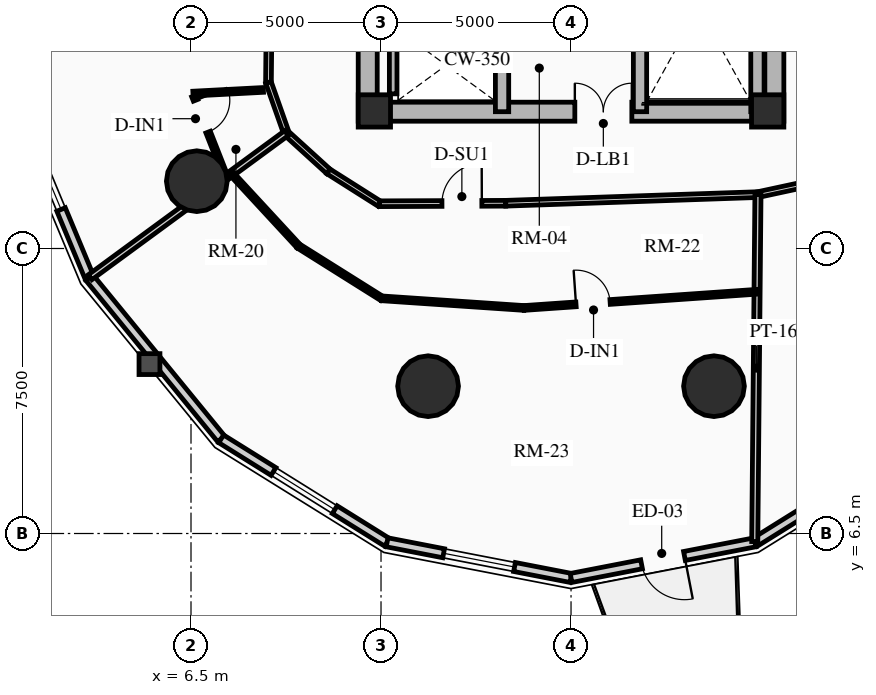
"""IFC4 building model, lengths in metres.
Left out: names, types, materials, properties, quantities, classifications, styles, units other than length and angle.
Written with IfcOpenShell. Run it as: python <this file> out.ifc"""

import sys

from ifc_helpers import new_model, si_unit, direction, frame, frame_2d, origin, origin_2d, place, context, subcontext, project, spatial, rectangle, circle, extrude, source, transform, mapped, element, fill, save


model = new_model("IFC4")
c1 = context("Model", 3, precision=1e-05, world=origin(), true_north=direction((0.0, 1.0)))
c2 = subcontext(c1, "Body", "Model", "MODEL_VIEW")
j1 = project(units=[si_unit("LENGTHUNIT", "METRE"), si_unit("PLANEANGLEUNIT", "RADIAN")], contexts=[c1])
p1 = place(None, origin())
s1 = spatial("IfcSite", under=j1, at=p1, CompositionType="ELEMENT")
p2 = place(p1, origin())
s2 = spatial("IfcBuilding", under=s1, at=p2, CompositionType="ELEMENT")
p3 = place(p2, frame((0.0, 0.0, 51.1)))
s3 = spatial("IfcBuildingStorey", under=s2, at=p3, CompositionType="ELEMENT", Elevation=51.1)
for number, where, z_axis, x_axis in (
    (1, (11.15, 17.35, 0.0), (0.0, 0.0, 1.0), (0.0, 1.0, 0.0)),
    (2, (21.85, 17.35, 0.0), (0.0, 0.0, 1.0), (0.0, 1.0, 0.0)),
):
    element("IfcWall", number, at=place(p3, frame(where, z_axis=z_axis, x_axis=x_axis)), inside=s3, PredefinedType="SHEAR", context=c2, shape_type="SweptSolid", body=[
        extrude(rectangle(XDim=14.3, YDim=0.5, at=frame_2d((7.15, 0.0))), origin(), (0.0, 0.0, 1.0), 2.91),
    ])
p4 = place(p3, frame((11.15, 17.6, 0.0), z_axis=(0.0, 0.0, 1.0), x_axis=(1.0, 0.0, 0.0)))
e3 = element("IfcWall", 3, at=p4, inside=s3, PredefinedType="SHEAR", context=c2, shape_type="SweptSolid", body=[
    extrude(rectangle(XDim=10.7, YDim=0.5, at=frame_2d((5.35, 0.0))), origin(), (0.0, 0.0, 1.0), 2.91),
])
m1 = source(origin(), c2, "Body", "SweptSolid", [
    extrude(rectangle(XDim=1.5, YDim=2.02, at=frame_2d((0.75, 1.01))), frame((0.0, 0.26, 0.0), z_axis=(0.0, -1.0, 0.0), x_axis=(1.0, 0.0, 0.0)), (0.0, 0.0, 1.0), 0.52),
])
p5 = place(p4, frame((5.45, 0.0, 0.0)))
e4 = element("IfcOpeningElement", 4, at=p5, cuts=e3, PredefinedType="OPENING", context=c2, shape_type="MappedRepresentation", body=[
    mapped(m1, transform((0.0, 0.0, 0.0), x_axis=(1.0, 0.0, 0.0), y_axis=(0.0, 1.0, 0.0), z_axis=(0.0, 0.0, 1.0), scale=1.0)),
])
p6 = place(p3, frame((14.685, 17.6, 0.0), z_axis=(0.0, 0.0, 1.0), x_axis=(0.0, 1.0, 0.0)))
e5 = element("IfcWall", 5, at=p6, inside=s3, PredefinedType="SHEAR", context=c2, shape_type="SweptSolid", body=[
    extrude(rectangle(XDim=13.8, YDim=0.35, at=frame_2d((6.9, 0.0))), origin(), (0.0, 0.0, 1.0), 2.91),
])
m2 = source(origin(), c2, "Body", "SweptSolid", [
    extrude(rectangle(XDim=1.1, YDim=2.015, at=frame_2d((0.55, 1.007))), frame((0.0, 0.185, 0.0), z_axis=(0.0, -1.0, 0.0), x_axis=(1.0, 0.0, 0.0)), (0.0, 0.0, 1.0), 0.37),
])
p7 = place(p6, frame((4.9, 0.0, 0.0)))
e6 = element("IfcOpeningElement", 6, at=p7, cuts=e5, PredefinedType="OPENING", context=c2, shape_type="MappedRepresentation", body=[
    mapped(m2, transform((0.0, 0.0, 0.0), x_axis=(1.0, 0.0, 0.0), y_axis=(0.0, 1.0, 0.0), z_axis=(0.0, 0.0, 1.0), scale=1.0)),
])
m3 = source(origin(), c2, "Body", "SweptSolid", [
    extrude(rectangle(XDim=1.15, YDim=2.02, at=frame_2d((0.575, 1.01))), frame((0.0, 0.185, 0.0), z_axis=(0.0, -1.0, 0.0), x_axis=(1.0, 0.0, 0.0)), (0.0, 0.0, 1.0), 0.37),
])
p8 = place(p6, frame((7.32, 0.0, 0.0)))
e7 = element("IfcOpeningElement", 7, at=p8, cuts=e5, PredefinedType="OPENING", context=c2, shape_type="MappedRepresentation", body=[
    mapped(m3, transform((0.0, 0.0, 0.0), x_axis=(1.0, 0.0, 0.0), y_axis=(0.0, 1.0, 0.0), z_axis=(0.0, 0.0, 1.0), scale=1.0)),
])
p9 = place(p3, frame((18.315, 17.6, 0.0), z_axis=(0.0, 0.0, 1.0), x_axis=(0.0, 1.0, 0.0)))
e8 = element("IfcWall", 8, at=p9, inside=s3, PredefinedType="SHEAR", context=c2, shape_type="SweptSolid", body=[
    extrude(rectangle(XDim=13.8, YDim=0.35, at=frame_2d((6.9, 0.0))), origin(), (0.0, 0.0, 1.0), 2.91),
])
p10 = place(p9, frame((10.025, 0.0, 0.0)))
e9 = element("IfcOpeningElement", 9, at=p10, cuts=e8, PredefinedType="OPENING", context=c2, shape_type="MappedRepresentation", body=[
    mapped(m2, transform((0.0, 0.0, 0.0), x_axis=(1.0, 0.0, 0.0), y_axis=(0.0, 1.0, 0.0), z_axis=(0.0, 0.0, 1.0), scale=1.0)),
])
p11 = place(p9, frame((12.025, 0.0, 0.0)))
e10 = element("IfcOpeningElement", 10, at=p11, cuts=e8, PredefinedType="OPENING", context=c2, shape_type="MappedRepresentation", body=[
    mapped(m2, transform((0.0, 0.0, 0.0), x_axis=(1.0, 0.0, 0.0), y_axis=(0.0, 1.0, 0.0), z_axis=(0.0, 0.0, 1.0), scale=1.0)),
])
p12 = place(p9, frame((5.33, 0.0, 0.0)))
e11 = element("IfcOpeningElement", 11, at=p12, cuts=e8, PredefinedType="OPENING", context=c2, shape_type="MappedRepresentation", body=[
    mapped(m3, transform((0.0, 0.0, 0.0), x_axis=(1.0, 0.0, 0.0), y_axis=(0.0, 1.0, 0.0), z_axis=(0.0, 0.0, 1.0), scale=1.0)),
])
p13 = place(p3, frame((21.405, 17.6, 0.0), z_axis=(0.0, 0.0, 1.0), x_axis=(0.0, 1.0, 0.0)))
e12 = element("IfcWall", 12, at=p13, inside=s3, PredefinedType="SHEAR", context=c2, shape_type="SweptSolid", body=[
    extrude(rectangle(XDim=6.745, YDim=0.35, at=frame_2d((3.373, 0.0))), origin(), (0.0, 0.0, 1.0), 2.91),
])
for number, where, z_axis, x_axis in (
    (13, (11.325, 17.62, 0.0), (0.0, 0.0, 1.0), (1.0, 0.0, 0.0)),
    (14, (21.675, 17.62, 0.0), (0.0, 0.0, 1.0), (1.0, 0.0, 0.0)),
):
    element("IfcColumn", number, at=place(p3, frame(where, z_axis=z_axis, x_axis=x_axis)), inside=s3, PredefinedType="COLUMN", context=c2, shape_type="SweptSolid", body=[
        extrude(rectangle(XDim=0.85, YDim=0.85, at=origin_2d()), origin(), (0.0, 0.0, 1.0), 2.91),
    ])
for number, where, z_axis, x_axis in (
    (15, (6.653, 15.771, 0.0), (0.0, 0.0, 1.0), (1.0, 0.0, 0.0)),
    (16, (12.739, 10.377, 0.0), (0.0, 0.0, 1.0), (1.0, 0.0, 0.0)),
    (17, (20.261, 10.377, 0.0), (0.0, 0.0, 1.0), (1.0, 0.0, 0.0)),
):
    element("IfcColumn", number, at=place(p3, frame(where, z_axis=z_axis, x_axis=x_axis)), inside=s3, PredefinedType="USERDEFINED", context=c2, shape_type="SweptSolid", body=[
        extrude(circle(Radius=0.8, at=origin_2d()), origin(), (0.0, 0.0, 1.0), 2.91),
    ])
p14 = place(p3, frame((3.828, 13.232, 0.0), z_axis=(0.0, 0.0, 1.0), x_axis=(-0.384348836956, 0.923187939442, 0.0)))
e18 = element("IfcWall", 18, at=p14, inside=s3, PredefinedType="SOLIDWALL", context=c2, shape_type="SweptSolid", body=[
    extrude(rectangle(XDim=5.789, YDim=0.24, at=frame_2d((2.894, 0.0))), origin(), (0.0, 0.0, 1.0), 2.073),
])
m4 = source(origin(), c2, "Body", "SweptSolid", [
    extrude(rectangle(XDim=1.9, YDim=1.35, at=frame_2d((0.95, 0.675))), frame((0.0, 0.13, 0.0), z_axis=(0.0, -1.0, 0.0), x_axis=(1.0, 0.0, 0.0)), (0.0, 0.0, 1.0), 0.26),
])
p15 = place(p14, frame((1.944, 0.0, 0.65)))
e19 = element("IfcOpeningElement", 19, at=p15, cuts=e18, PredefinedType="OPENING", context=c2, shape_type="MappedRepresentation", body=[
    mapped(m4, transform((0.0, 0.0, 0.0), x_axis=(1.0, 0.0, 0.0), y_axis=(0.0, 1.0, 0.0), z_axis=(0.0, 0.0, 1.0), scale=1.0)),
])
p16 = place(p3, frame((7.293, 8.991, 0.0), z_axis=(0.0, 0.0, 1.0), x_axis=(-0.632713287022, 0.77438614168, 0.0)))
e20 = element("IfcWall", 20, at=p16, inside=s3, PredefinedType="SOLIDWALL", context=c2, shape_type="SweptSolid", body=[
    extrude(rectangle(XDim=5.477, YDim=0.24, at=frame_2d((2.738, 0.0))), origin(), (0.0, 0.0, 1.0), 2.073),
])
p17 = place(p3, frame((11.66, 6.268, 0.0), z_axis=(0.0, 0.0, 1.0), x_axis=(-0.848533613342, 0.529141481107, 0.0)))
e21 = element("IfcWall", 21, at=p17, inside=s3, PredefinedType="SOLIDWALL", context=c2, shape_type="SweptSolid", body=[
    extrude(rectangle(XDim=5.146, YDim=0.24, at=frame_2d((2.573, 0.0))), origin(), (0.0, 0.0, 1.0), 2.073),
])
p18 = place(p17, frame((1.623, 0.0, 0.65)))
e22 = element("IfcOpeningElement", 22, at=p18, cuts=e21, PredefinedType="OPENING", context=c2, shape_type="MappedRepresentation", body=[
    mapped(m4, transform((0.0, 0.0, 0.0), x_axis=(1.0, 0.0, 0.0), y_axis=(0.0, 1.0, 0.0), z_axis=(0.0, 0.0, 1.0), scale=1.0)),
])
p19 = place(p3, frame((16.5, 5.33, 0.0), z_axis=(0.0, 0.0, 1.0), x_axis=(-0.981725274071, 0.190303668512, 0.0)))
e23 = element("IfcWall", 23, at=p19, inside=s3, PredefinedType="SOLIDWALL", context=c2, shape_type="SweptSolid", body=[
    extrude(rectangle(XDim=4.93, YDim=0.24, at=frame_2d((2.465, 0.0))), origin(), (0.0, 0.0, 1.0), 2.073),
])
p20 = place(p19, frame((1.515, 0.0, 0.65)))
e24 = element("IfcOpeningElement", 24, at=p20, cuts=e23, PredefinedType="OPENING", context=c2, shape_type="MappedRepresentation", body=[
    mapped(m4, transform((0.0, 0.0, 0.0), x_axis=(1.0, 0.0, 0.0), y_axis=(0.0, 1.0, 0.0), z_axis=(0.0, 0.0, 1.0), scale=1.0)),
])
p21 = place(p3, frame((21.34, 6.268, 0.0), z_axis=(0.0, 0.0, 1.0), x_axis=(-0.981725274071, -0.190303668512, 0.0)))
e25 = element("IfcWall", 25, at=p21, inside=s3, PredefinedType="SOLIDWALL", context=c2, shape_type="SweptSolid", body=[
    extrude(rectangle(XDim=4.93, YDim=0.24, at=frame_2d((2.465, 0.0))), origin(), (0.0, 0.0, 1.0), 2.073),
])
m5 = source(origin(), c2, "Body", "SweptSolid", [
    extrude(rectangle(XDim=1.15, YDim=2.005, at=frame_2d((0.575, 1.002))), frame((0.0, 0.13, 0.0), z_axis=(0.0, -1.0, 0.0), x_axis=(1.0, 0.0, 0.0)), (0.0, 0.0, 1.0), 0.26),
])
p22 = place(p21, frame((1.89, 0.0, 0.0)))
e26 = element("IfcOpeningElement", 26, at=p22, cuts=e25, PredefinedType="OPENING", context=c2, shape_type="MappedRepresentation", body=[
    mapped(m5, transform((0.0, 0.0, 0.0), x_axis=(1.0, 0.0, 0.0), y_axis=(0.0, 1.0, 0.0), z_axis=(0.0, 0.0, 1.0), scale=1.0)),
])
p23 = place(p3, frame((25.707, 8.991, 0.0), z_axis=(0.0, 0.0, 1.0), x_axis=(-0.848533613342, -0.529141481107, 0.0)))
e27 = element("IfcWall", 27, at=p23, inside=s3, PredefinedType="SOLIDWALL", context=c2, shape_type="SweptSolid", body=[
    extrude(rectangle(XDim=5.146, YDim=0.24, at=frame_2d((2.573, 0.0))), origin(), (0.0, 0.0, 1.0), 2.073),
])
p24 = place(p3, frame((11.82, 18.07, 0.0), z_axis=(0.0, 0.0, 1.0), x_axis=(0.0, 1.0, 0.0)))
e28 = element("IfcWall", 28, at=p24, inside=s3, PredefinedType="SHEAR", context=c2, shape_type="SweptSolid", body=[
    extrude(rectangle(XDim=1.635, YDim=0.2, at=frame_2d((0.817, 0.0))), origin(), (0.0, 0.0, 1.0), 2.91),
])
p25 = place(p3, frame((8.6, 24.5, 0.0), z_axis=(0.0, 0.0, 1.0), x_axis=(-0.010076760723, -0.999949228158, 0.0)))
e29 = element("IfcWall", 29, at=p25, inside=s3, PredefinedType="PARTITIONING", context=c2, shape_type="SweptSolid", body=[
    extrude(rectangle(XDim=6.13, YDim=0.15, at=frame_2d((3.065, 0.0))), origin(), (0.0, 0.0, 1.0), 2.159),
])
m6 = source(origin(), c2, "Body", "SweptSolid", [
    extrude(rectangle(XDim=1.05, YDim=2.015, at=frame_2d((0.525, 1.007))), frame((0.0, 0.085, 0.0), z_axis=(0.0, -1.0, 0.0), x_axis=(1.0, 0.0, 0.0)), (0.0, 0.0, 1.0), 0.17),
])
p26 = place(p25, frame((2.54, 0.0, 0.0)))
e30 = element("IfcOpeningElement", 30, at=p26, cuts=e29, PredefinedType="OPENING", context=c2, shape_type="MappedRepresentation", body=[
    mapped(m6, transform((0.0, 0.0, 0.0), x_axis=(1.0, 0.0, 0.0), y_axis=(0.0, 1.0, 0.0), z_axis=(0.0, 0.0, 1.0), scale=1.0)),
])
p27 = place(p3, frame((8.538, 18.371, 0.0), z_axis=(0.0, 0.0, 1.0), x_axis=(0.3330273821, -0.942917155837, 0.0)))
e31 = element("IfcWall", 31, at=p27, inside=s3, PredefinedType="PARTITIONING", context=c2, shape_type="SweptSolid", body=[
    extrude(rectangle(XDim=1.417, YDim=0.15, at=frame_2d((0.708, 0.0))), origin(), (0.0, 0.0, 1.0), 2.205),
])
p28 = place(p3, frame((9.01, 17.034, 0.0), z_axis=(0.0, 0.0, 1.0), x_axis=(0.739733009791, -0.672900493554, 0.0)))
e32 = element("IfcWall", 32, at=p28, inside=s3, PredefinedType="PARTITIONING", context=c2, shape_type="SweptSolid", body=[
    extrude(rectangle(XDim=1.494, YDim=0.15, at=frame_2d((0.747, 0.0))), origin(), (0.0, 0.0, 1.0), 2.159),
])
p29 = place(p3, frame((10.115, 16.029, 0.0), z_axis=(0.0, 0.0, 1.0), x_axis=(0.844897677802, -0.534927952201, 0.0)))
e33 = element("IfcWall", 33, at=p29, inside=s3, PredefinedType="PARTITIONING", context=c2, shape_type="SweptSolid", body=[
    extrude(rectangle(XDim=1.591, YDim=0.15, at=frame_2d((0.795, 0.0))), origin(), (0.0, 0.0, 1.0), 2.205),
])
p30 = place(p3, frame((11.46, 15.178, 0.0), z_axis=(0.0, 0.0, 1.0), x_axis=(0.999992694689, 0.003822377251, 0.0)))
e34 = element("IfcWall", 34, at=p30, inside=s3, PredefinedType="PARTITIONING", context=c2, shape_type="SweptSolid", body=[
    extrude(rectangle(XDim=3.321, YDim=0.15, at=frame_2d((1.661, 0.0))), origin(), (0.0, 0.0, 1.0), 2.159),
])
p31 = place(p30, frame((1.643, 0.0, 0.0)))
e35 = element("IfcOpeningElement", 35, at=p31, cuts=e34, PredefinedType="OPENING", context=c2, shape_type="MappedRepresentation", body=[
    mapped(m6, transform((0.0, 0.0, 0.0), x_axis=(1.0, 0.0, 0.0), y_axis=(0.0, 1.0, 0.0), z_axis=(0.0, 0.0, 1.0), scale=1.0)),
])
p32 = place(p3, frame((14.781, 15.191, 0.0), z_axis=(0.0, 0.0, 1.0), x_axis=(0.999412963972, 0.034259705842, 0.0)))
e36 = element("IfcWall", 36, at=p32, inside=s3, PredefinedType="PARTITIONING", context=c2, shape_type="SweptSolid", body=[
    extrude(rectangle(XDim=6.642, YDim=0.15, at=frame_2d((3.321, 0.0))), origin(), (0.0, 0.0, 1.0), 2.159),
])
p33 = place(p3, frame((21.419, 15.418, 0.0), z_axis=(0.0, 0.0, 1.0), x_axis=(0.977540384091, 0.210748184977, 0.0)))
e37 = element("IfcWall", 37, at=p33, inside=s3, PredefinedType="PARTITIONING", context=c2, shape_type="SweptSolid", body=[
    extrude(rectangle(XDim=1.887, YDim=0.15, at=frame_2d((0.944, 0.0))), origin(), (0.0, 0.0, 1.0), 2.205),
])
p34 = place(p3, frame((9.01, 17.034, 0.0), z_axis=(0.0, 0.0, 1.0), x_axis=(-0.806234156757, -0.591596555499, 0.0)))
e38 = element("IfcWall", 38, at=p34, inside=s3, PredefinedType="PARTITIONING", context=c2, shape_type="SweptSolid", body=[
    extrude(rectangle(XDim=6.407, YDim=0.16, at=frame_2d((3.204, 0.0))), origin(), (0.0, 0.0, 1.0), 2.073),
])
p35 = place(p3, frame((21.419, 15.418, 0.0), z_axis=(0.0, 0.0, 1.0), x_axis=(-0.009277675551, -0.999956961442, 0.0)))
e39 = element("IfcWall", 39, at=p35, inside=s3, PredefinedType="PARTITIONING", context=c2, shape_type="SweptSolid", body=[
    extrude(rectangle(XDim=9.131, YDim=0.16, at=frame_2d((4.566, 0.0))), origin(), (0.0, 0.0, 1.0), 2.073),
])
p36 = place(p3, frame((8.404, 18.173, 0.0), z_axis=(0.0, 0.0, 1.0), x_axis=(-0.998640999178, -0.052116741655, 0.0)))
e40 = element("IfcWall", 40, at=p36, inside=s3, PredefinedType="PARTITIONING", context=c2, shape_type="SweptSolid", body=[
    extrude(rectangle(XDim=1.855, YDim=0.125, at=frame_2d((0.927, 0.0))), origin(), (0.0, 0.0, 1.0), 2.205),
])
p37 = place(p3, frame((6.577, 18.012, 0.0), z_axis=(0.0, 0.0, 1.0), x_axis=(0.366179258149, -0.930544330433, 0.0)))
e41 = element("IfcWall", 41, at=p37, inside=s3, PredefinedType="PARTITIONING", context=c2, shape_type="SweptSolid", body=[
    extrude(rectangle(XDim=2.208, YDim=0.125, at=frame_2d((1.104, 0.0))), origin(), (0.0, 0.0, 1.0), 2.159),
])
m7 = source(origin(), c2, "Body", "SweptSolid", [
    extrude(rectangle(XDim=0.9, YDim=2.005, at=frame_2d((0.45, 1.002))), frame((0.0, 0.073, 0.0), z_axis=(0.0, -1.0, 0.0), x_axis=(1.0, 0.0, 0.0)), (0.0, 0.0, 1.0), 0.145),
])
p38 = place(p37, frame((0.12, 0.0, 0.0)))
e42 = element("IfcOpeningElement", 42, at=p38, cuts=e41, PredefinedType="OPENING", context=c2, shape_type="MappedRepresentation", body=[
    mapped(m7, transform((0.0, 0.0, 0.0), x_axis=(1.0, 0.0, 0.0), y_axis=(0.0, 1.0, 0.0), z_axis=(0.0, 0.0, 1.0), scale=1.0)),
])
p39 = place(p3, frame((7.564, 15.973, 0.0), z_axis=(0.0, 0.0, 1.0), x_axis=(0.678576389573, -0.734529838409, 0.0)))
e43 = element("IfcWall", 43, at=p39, inside=s3, PredefinedType="PARTITIONING", context=c2, shape_type="SweptSolid", body=[
    extrude(rectangle(XDim=2.601, YDim=0.125, at=frame_2d((1.3, 0.0))), origin(), (0.0, 0.0, 1.0), 2.635),
])
p40 = place(p3, frame((9.329, 14.063, 0.0), z_axis=(0.0, 0.0, 1.0), x_axis=(0.846882074778, -0.531780736225, 0.0)))
e44 = element("IfcWall", 44, at=p40, inside=s3, PredefinedType="PARTITIONING", context=c2, shape_type="SweptSolid", body=[
    extrude(rectangle(XDim=2.585, YDim=0.125, at=frame_2d((1.292, 0.0))), origin(), (0.0, 0.0, 1.0), 2.205),
])
p41 = place(p3, frame((11.518, 12.688, 0.0), z_axis=(0.0, 0.0, 1.0), x_axis=(0.997722259414, -0.067455860152, 0.0)))
e45 = element("IfcWall", 45, at=p41, inside=s3, PredefinedType="PARTITIONING", context=c2, shape_type="SweptSolid", body=[
    extrude(rectangle(XDim=3.753, YDim=0.125, at=frame_2d((1.876, 0.0))), origin(), (0.0, 0.0, 1.0), 2.159),
])
p42 = place(p3, frame((15.262, 12.435, 0.0), z_axis=(0.0, 0.0, 1.0), x_axis=(0.997593149667, 0.069339077998, 0.0)))
e46 = element("IfcWall", 46, at=p42, inside=s3, PredefinedType="PARTITIONING", context=c2, shape_type="SweptSolid", body=[
    extrude(rectangle(XDim=6.148, YDim=0.125, at=frame_2d((3.074, 0.0))), origin(), (0.0, 0.0, 1.0), 2.159),
])
p43 = place(p42, frame((1.372, 0.0, 0.0)))
e47 = element("IfcOpeningElement", 47, at=p43, cuts=e46, PredefinedType="OPENING", context=c2, shape_type="MappedRepresentation", body=[
    mapped(m7, transform((0.0, 0.0, 0.0), x_axis=(1.0, 0.0, 0.0), y_axis=(0.0, 1.0, 0.0), z_axis=(0.0, 0.0, 1.0), scale=1.0)),
])
m8 = source(origin(), c2, "Body", "SweptSolid", [
    extrude(rectangle(XDim=1.9, YDim=1.35, at=frame_2d((0.95, 0.675))), frame((0.0, 0.03, 0.0), z_axis=(0.0, -1.0, 0.0), x_axis=(1.0, 0.0, 0.0)), (0.0, 0.0, 1.0), 0.06),
])
p44 = place(p15, origin())
e48 = element("IfcWindow", 48, at=p44, inside=s3, PartitioningType="DOUBLE_PANEL_VERTICAL", PredefinedType="WINDOW", context=c2, shape_type="MappedRepresentation", body=[
    mapped(m8, transform((0.0, 0.0, 0.0), x_axis=(1.0, 0.0, 0.0), y_axis=(0.0, 1.0, 0.0), z_axis=(0.0, 0.0, 1.0), scale=1.0)),
])
fill(e19, e48)
p45 = place(p18, origin())
e49 = element("IfcWindow", 49, at=p45, inside=s3, PartitioningType="DOUBLE_PANEL_VERTICAL", PredefinedType="WINDOW", context=c2, shape_type="MappedRepresentation", body=[
    mapped(m8, transform((0.0, 0.0, 0.0), x_axis=(1.0, 0.0, 0.0), y_axis=(0.0, 1.0, 0.0), z_axis=(0.0, 0.0, 1.0), scale=1.0)),
])
fill(e22, e49)
p46 = place(p20, origin())
e50 = element("IfcWindow", 50, at=p46, inside=s3, PartitioningType="DOUBLE_PANEL_VERTICAL", PredefinedType="WINDOW", context=c2, shape_type="MappedRepresentation", body=[
    mapped(m8, transform((0.0, 0.0, 0.0), x_axis=(1.0, 0.0, 0.0), y_axis=(0.0, 1.0, 0.0), z_axis=(0.0, 0.0, 1.0), scale=1.0)),
])
fill(e24, e50)
m9 = source(origin(), c2, "Body", "SweptSolid", [
    extrude(rectangle(XDim=1.15, YDim=2.005, at=frame_2d((0.575, 1.002))), frame((0.0, 0.025, 0.0), z_axis=(0.0, -1.0, 0.0), x_axis=(1.0, 0.0, 0.0)), (0.0, 0.0, 1.0), 0.05),
])
p47 = place(p22, origin())
e51 = element("IfcDoor", 51, at=p47, inside=s3, OperationType="SINGLE_SWING_LEFT", PredefinedType="DOOR", context=c2, shape_type="MappedRepresentation", body=[
    mapped(m9, transform((0.0, 0.0, 0.0), x_axis=(1.0, 0.0, 0.0), y_axis=(0.0, 1.0, 0.0), z_axis=(0.0, 0.0, 1.0), scale=1.0)),
])
fill(e26, e51)
m10 = source(origin(), c2, "Body", "SweptSolid", [
    extrude(rectangle(XDim=1.5, YDim=2.02, at=frame_2d((0.75, 1.01))), frame((0.0, 0.025, 0.0), z_axis=(0.0, -1.0, 0.0), x_axis=(1.0, 0.0, 0.0)), (0.0, 0.0, 1.0), 0.05),
])
p48 = place(p5, origin())
e52 = element("IfcDoor", 52, at=p48, inside=s3, OperationType="DOUBLE_DOOR_SINGLE_SWING", PredefinedType="DOOR", context=c2, shape_type="MappedRepresentation", body=[
    mapped(m10, transform((0.0, 0.0, 0.0), x_axis=(1.0, 0.0, 0.0), y_axis=(0.0, 1.0, 0.0), z_axis=(0.0, 0.0, 1.0), scale=1.0)),
])
fill(e4, e52)
m11 = source(origin(), c2, "Body", "SweptSolid", [
    extrude(rectangle(XDim=0.9, YDim=2.005, at=frame_2d((0.45, 1.002))), frame((0.0, 0.025, 0.0), z_axis=(0.0, -1.0, 0.0), x_axis=(1.0, 0.0, 0.0)), (0.0, 0.0, 1.0), 0.05),
])
p49 = place(p38, origin())
e53 = element("IfcDoor", 53, at=p49, inside=s3, OperationType="SINGLE_SWING_LEFT", PredefinedType="DOOR", context=c2, shape_type="MappedRepresentation", body=[
    mapped(m11, transform((0.0, 0.0, 0.0), x_axis=(1.0, 0.0, 0.0), y_axis=(0.0, 1.0, 0.0), z_axis=(0.0, 0.0, 1.0), scale=1.0)),
])
fill(e42, e53)
m12 = source(origin(), c2, "Body", "SweptSolid", [
    extrude(rectangle(XDim=1.05, YDim=2.015, at=frame_2d((0.525, 1.007))), frame((0.0, 0.025, 0.0), z_axis=(0.0, -1.0, 0.0), x_axis=(1.0, 0.0, 0.0)), (0.0, 0.0, 1.0), 0.05),
])
p50 = place(p31, origin())
e54 = element("IfcDoor", 54, at=p50, inside=s3, OperationType="SINGLE_SWING_RIGHT", PredefinedType="DOOR", context=c2, shape_type="MappedRepresentation", body=[
    mapped(m12, transform((0.0, 0.0, 0.0), x_axis=(1.0, 0.0, 0.0), y_axis=(0.0, 1.0, 0.0), z_axis=(0.0, 0.0, 1.0), scale=1.0)),
])
fill(e35, e54)
p51 = place(p43, origin())
e55 = element("IfcDoor", 55, at=p51, inside=s3, OperationType="SINGLE_SWING_LEFT", PredefinedType="DOOR", context=c2, shape_type="MappedRepresentation", body=[
    mapped(m11, transform((0.0, 0.0, 0.0), x_axis=(1.0, 0.0, 0.0), y_axis=(0.0, 1.0, 0.0), z_axis=(0.0, 0.0, 1.0), scale=1.0)),
])
fill(e47, e55)
save(model, sys.argv[1])
